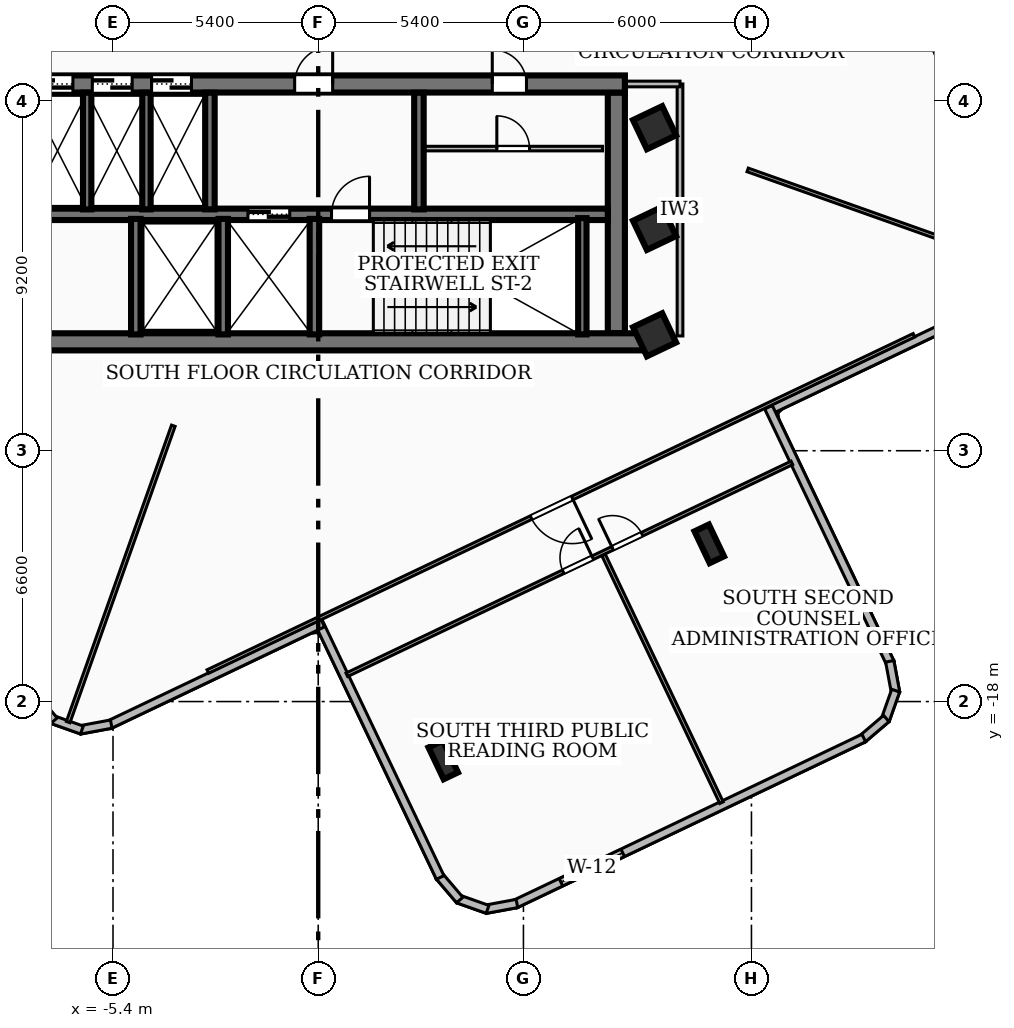
"""IFC4 building model, lengths in metres.
Left out: names, types, materials, properties, quantities, classifications, styles, units other than length and angle.
Written with IfcOpenShell. Run it as: python <this file> out.ifc"""

import sys

from ifc_helpers import new_model, si_unit, direction, frame, frame_2d, origin, origin_2d, place, context, subcontext, project, spatial, rectangle, i_section, extrude, element, fill, save


model = new_model("IFC4")
c1 = context("Model", 3, precision=1e-05, world=origin(), true_north=direction((0.0, 1.0)))
c2 = subcontext(c1, "Body", "Model", "MODEL_VIEW")
j1 = project(units=[si_unit("LENGTHUNIT", "METRE"), si_unit("PLANEANGLEUNIT", "RADIAN")], contexts=[c1])
p1 = place(None, origin())
s1 = spatial("IfcSite", under=j1, at=p1, CompositionType="ELEMENT")
p2 = place(p1, origin())
s2 = spatial("IfcBuilding", under=s1, at=p2, CompositionType="ELEMENT")
p3 = place(p2, frame((0.0, 0.0, 188.28)))
s3 = spatial("IfcBuildingStorey", under=s2, at=p3, CompositionType="ELEMENT", Elevation=188.28)
p4 = place(p3, frame((8.78, -8.535, 0.0), z_axis=(0.0, 0.0, 1.0), x_axis=(-1.0, 0.0, 0.0)))
e1 = element("IfcWall", 1, at=p4, inside=s3, PredefinedType="SHEAR", context=c2, shape_type="SweptSolid", body=[
    extrude(rectangle(XDim=17.56, YDim=0.45, at=frame_2d((8.78, 0.0))), origin(), (0.0, 0.0, 1.0), 4.06),
])
p5 = place(p3, frame((-8.07, -1.75, 0.0), z_axis=(0.0, 0.0, 1.0), x_axis=(1.0, 0.0, 0.0)))
e2 = element("IfcWall", 2, at=p5, inside=s3, PredefinedType="SHEAR", context=c2, shape_type="SweptSolid", body=[
    extrude(rectangle(XDim=16.14, YDim=0.45, at=frame_2d((8.07, 0.0))), origin(), (0.0, 0.0, 1.0), 4.06),
])
p6 = place(p5, frame((7.45, 0.0, 0.0)))
e3 = element("IfcOpeningElement", 3, at=p6, cuts=e2, PredefinedType="OPENING", context=c2, shape_type="SweptSolid", body=[
    extrude(rectangle(XDim=1.0, YDim=2.1, at=frame_2d((0.5, 1.05))), frame((0.0, 0.235, 0.0), z_axis=(0.0, -1.0, 0.0), x_axis=(1.0, 0.0, 0.0)), (0.0, 0.0, 1.0), 0.47),
])
p7 = place(p5, frame((12.65, 0.0, 0.0)))
e4 = element("IfcOpeningElement", 4, at=p7, cuts=e2, PredefinedType="OPENING", context=c2, shape_type="SweptSolid", body=[
    extrude(rectangle(XDim=0.9, YDim=2.06, at=frame_2d((0.45, 1.03))), frame((0.0, 0.235, 0.0), z_axis=(0.0, -1.0, 0.0), x_axis=(1.0, 0.0, 0.0)), (0.0, 0.0, 1.0), 0.47),
])
p8 = place(p5, frame((0.565, 0.0, 0.0)))
e5 = element("IfcOpeningElement", 5, at=p8, cuts=e2, PredefinedType="OPENING", context=c2, shape_type="SweptSolid", body=[
    extrude(rectangle(XDim=1.05, YDim=2.15, at=frame_2d((0.525, 1.075))), frame((0.0, 0.235, 0.0), z_axis=(0.0, -1.0, 0.0), x_axis=(1.0, 0.0, 0.0)), (0.0, 0.0, 1.0), 0.47),
])
p9 = place(p5, frame((2.125, 0.0, 0.0)))
e6 = element("IfcOpeningElement", 6, at=p9, cuts=e2, PredefinedType="OPENING", context=c2, shape_type="SweptSolid", body=[
    extrude(rectangle(XDim=1.05, YDim=2.15, at=frame_2d((0.525, 1.075))), frame((0.0, 0.235, 0.0), z_axis=(0.0, -1.0, 0.0), x_axis=(1.0, 0.0, 0.0)), (0.0, 0.0, 1.0), 0.47),
])
p10 = place(p5, frame((3.685, 0.0, 0.0)))
e7 = element("IfcOpeningElement", 7, at=p10, cuts=e2, PredefinedType="OPENING", context=c2, shape_type="SweptSolid", body=[
    extrude(rectangle(XDim=1.05, YDim=2.15, at=frame_2d((0.525, 1.075))), frame((0.0, 0.235, 0.0), z_axis=(0.0, -1.0, 0.0), x_axis=(1.0, 0.0, 0.0)), (0.0, 0.0, 1.0), 0.47),
])
p11 = place(p3, frame((7.845, -1.975, 0.0), z_axis=(0.0, 0.0, 1.0), x_axis=(0.0, -1.0, 0.0)))
e8 = element("IfcWall", 8, at=p11, inside=s3, PredefinedType="SHEAR", context=c2, shape_type="SweptSolid", body=[
    extrude(rectangle(XDim=6.335, YDim=0.45, at=frame_2d((3.167, 0.0))), origin(), (0.0, 0.0, 1.0), 4.06),
])
p12 = place(p3, frame((-7.62, -5.18, 0.0), z_axis=(0.0, 0.0, 1.0), x_axis=(1.0, 0.0, 0.0)))
e9 = element("IfcWall", 9, at=p12, inside=s3, PredefinedType="SOLIDWALL", context=c2, shape_type="SweptSolid", body=[
    extrude(rectangle(XDim=15.24, YDim=0.3, at=frame_2d((7.62, 0.0))), origin(), (0.0, 0.0, 1.0), 4.06),
])
p13 = place(p12, frame((5.77, 0.0, 0.0)))
e10 = element("IfcOpeningElement", 10, at=p13, cuts=e9, PredefinedType="OPENING", context=c2, shape_type="SweptSolid", body=[
    extrude(rectangle(XDim=1.1, YDim=2.15, at=frame_2d((0.55, 1.075))), frame((0.0, 0.16, 0.0), z_axis=(0.0, -1.0, 0.0), x_axis=(1.0, 0.0, 0.0)), (0.0, 0.0, 1.0), 0.32),
])
p14 = place(p12, frame((7.97, 0.0, 0.0)))
e11 = element("IfcOpeningElement", 11, at=p14, cuts=e9, PredefinedType="OPENING", context=c2, shape_type="SweptSolid", body=[
    extrude(rectangle(XDim=1.0, YDim=2.1, at=frame_2d((0.5, 1.05))), frame((0.0, 0.16, 0.0), z_axis=(0.0, -1.0, 0.0), x_axis=(1.0, 0.0, 0.0)), (0.0, 0.0, 1.0), 0.32),
])
p15 = place(p3, frame((6.95, -8.34, 0.0), z_axis=(0.0, 0.0, 1.0), x_axis=(0.0, 1.0, 0.0)))
e12 = element("IfcWall", 12, at=p15, inside=s3, PredefinedType="SOLIDWALL", context=c2, shape_type="SweptSolid", body=[
    extrude(rectangle(XDim=3.06, YDim=0.22, at=frame_2d((1.53, 0.0))), origin(), (0.0, 0.0, 1.0), 4.06),
])
for number, where, z_axis, x_axis in (
    (13, (-0.1, -8.34, 0.0), (0.0, 0.0, 1.0), (0.0, 1.0, 0.0)),
    (14, (-2.5, -8.34, 0.0), (0.0, 0.0, 1.0), (0.0, 1.0, 0.0)),
    (15, (-4.8, -8.34, 0.0), (0.0, 0.0, 1.0), (0.0, 1.0, 0.0)),
):
    element("IfcWall", number, at=place(p3, frame(where, z_axis=z_axis, x_axis=x_axis)), inside=s3, PredefinedType="SOLIDWALL", context=c2, shape_type="SweptSolid", body=[
        extrude(rectangle(XDim=3.04, YDim=0.25, at=frame_2d((1.52, 0.0))), origin(), (0.0, 0.0, 1.0), 4.06),
    ])
for number, where, z_axis, x_axis in (
    (16, (-2.85, -5.05, 0.0), (0.0, 0.0, 1.0), (0.0, 1.0, 0.0)),
    (17, (2.65, -5.05, 0.0), (0.0, 0.0, 1.0), (0.0, 1.0, 0.0)),
):
    element("IfcWall", number, at=place(p3, frame(where, z_axis=z_axis, x_axis=x_axis)), inside=s3, PredefinedType="SOLIDWALL", context=c2, shape_type="SweptSolid", body=[
        extrude(rectangle(XDim=3.07, YDim=0.25, at=frame_2d((1.535, 0.0))), origin(), (0.0, 0.0, 1.0), 4.06),
    ])
for number, where, z_axis, x_axis in (
    (18, (-6.08, -5.05, 0.0), (0.0, 0.0, 1.0), (0.0, 1.0, 0.0)),
    (19, (-4.52, -5.05, 0.0), (0.0, 0.0, 1.0), (0.0, 1.0, 0.0)),
):
    element("IfcWall", number, at=place(p3, frame(where, z_axis=z_axis, x_axis=x_axis)), inside=s3, PredefinedType="SOLIDWALL", context=c2, shape_type="SweptSolid", body=[
        extrude(rectangle(XDim=3.07, YDim=0.22, at=frame_2d((1.535, 0.0))), origin(), (0.0, 0.0, 1.0), 4.06),
    ])
for number, where, z_axis, x_axis in (
    (20, (8.85, -5.55, 0.0), (0.0, 0.0, 1.0), (0.903, 0.43, 0.0)),
    (21, (8.85, -2.9, 0.0), (0.0, 0.0, 1.0), (0.903, 0.43, 0.0)),
    (22, (8.85, -8.35, 0.0), (0.0, 0.0, 1.0), (0.903, 0.43, 0.0)),
):
    element("IfcColumn", number, at=place(p3, frame(where, z_axis=z_axis, x_axis=x_axis)), inside=s3, PredefinedType="COLUMN", context=c2, shape_type="SweptSolid", body=[
        extrude(rectangle(XDim=0.85, YDim=0.85, at=origin_2d()), origin(), (0.0, 0.0, 1.0), 4.32),
    ])
for number, where, z_axis, x_axis in (
    (23, (3.29, -19.536, 0.0), (0.0, 0.0, 1.0), (0.903, 0.43, 0.0)),
    (24, (10.29, -13.85, 0.0), (0.0, 0.0, 1.0), (0.903, 0.43, 0.0)),
):
    element("IfcColumn", number, at=place(p3, frame(where, z_axis=z_axis, x_axis=x_axis)), inside=s3, PredefinedType="COLUMN", context=c2, shape_type="SweptSolid", body=[
        extrude(i_section(OverallWidth=0.418, OverallDepth=0.927, WebThickness=0.019, FlangeThickness=0.032, at=origin_2d()), origin(), (0.0, 0.0, 1.0), 4.32),
    ])
p16 = place(p3, frame((15.935, 0.119, 0.0), z_axis=(0.0, 0.0, 1.0), x_axis=(0.429997588734, -0.902830035878, 0.0)))
e25 = element("IfcWall", 25, at=p16, inside=s3, PredefinedType="SOLIDWALL", context=c2, shape_type="SweptSolid", body=[
    extrude(rectangle(XDim=6.218, YDim=0.22, at=frame_2d((3.109, 0.0))), origin(), (0.0, 0.0, 1.0), 4.06),
])
p17 = place(p3, frame((17.91, -7.466, 0.0), z_axis=(0.0, 0.0, 1.0), x_axis=(-0.902871867899, -0.429909746524, 0.0)))
e26 = element("IfcWall", 26, at=p17, inside=s3, PredefinedType="SOLIDWALL", context=c2, shape_type="SweptSolid", body=[
    extrude(rectangle(XDim=6.76, YDim=0.22, at=frame_2d((3.38, 0.0))), origin(), (0.0, 0.0, 1.0), 4.06),
])
p18 = place(p3, frame((11.848, -10.255, 0.0), z_axis=(0.0, 0.0, 1.0), x_axis=(0.429966614546, -0.902844787533, 0.0)))
e27 = element("IfcWall", 27, at=p18, inside=s3, PredefinedType="SOLIDWALL", context=c2, shape_type="SweptSolid", body=[
    extrude(rectangle(XDim=7.459, YDim=0.22, at=frame_2d((3.729, 0.0))), origin(), (0.0, 0.0, 1.0), 4.06),
])
p19 = place(p3, frame((15.039, -16.941, 0.0), z_axis=(0.0, 0.0, 1.0), x_axis=(0.182999909077, -0.983112930074, 0.0)))
e28 = element("IfcWall", 28, at=p19, inside=s3, PredefinedType="SOLIDWALL", context=c2, shape_type="SweptSolid", body=[
    extrude(rectangle(XDim=0.835, YDim=0.22, at=frame_2d((0.417, 0.0))), origin(), (0.0, 0.0, 1.0), 4.06),
])
p20 = place(p3, frame((15.195, -17.713, 0.0), z_axis=(0.0, 0.0, 1.0), x_axis=(-0.33420520266, -0.942500335552, 0.0)))
e29 = element("IfcWall", 29, at=p20, inside=s3, PredefinedType="SOLIDWALL", context=c2, shape_type="SweptSolid", body=[
    extrude(rectangle(XDim=0.82, YDim=0.22, at=frame_2d((0.41, 0.0))), origin(), (0.0, 0.0, 1.0), 4.06),
])
p21 = place(p3, frame((14.948, -18.446, 0.0), z_axis=(0.0, 0.0, 1.0), x_axis=(-0.76070207285, -0.649101191157, 0.0)))
e30 = element("IfcWall", 30, at=p21, inside=s3, PredefinedType="SOLIDWALL", context=c2, shape_type="SweptSolid", body=[
    extrude(rectangle(XDim=0.833, YDim=0.22, at=frame_2d((0.417, 0.0))), origin(), (0.0, 0.0, 1.0), 4.06),
])
p22 = place(p3, frame((14.356, -18.96, 0.0), z_axis=(0.0, 0.0, 1.0), x_axis=(-0.902857854372, -0.429939175696, 0.0)))
e31 = element("IfcWall", 31, at=p22, inside=s3, PredefinedType="SOLIDWALL", context=c2, shape_type="SweptSolid", body=[
    extrude(rectangle(XDim=10.162, YDim=0.22, at=frame_2d((5.081, 0.0))), origin(), (0.0, 0.0, 1.0), 4.06),
])
p23 = place(p22, frame((7.026, 0.0, 0.85)))
e32 = element("IfcOpeningElement", 32, at=p23, cuts=e31, PredefinedType="OPENING", context=c2, shape_type="SweptSolid", body=[
    extrude(rectangle(XDim=1.8, YDim=1.6, at=frame_2d((0.9, 0.8))), frame((0.0, 0.12, 0.0), z_axis=(0.0, -1.0, 0.0), x_axis=(1.0, 0.0, 0.0)), (0.0, 0.0, 1.0), 0.24),
])
p24 = place(p3, frame((5.229, -23.313, 0.0), z_axis=(0.0, 0.0, 1.0), x_axis=(-0.983309106839, -0.18194284929, 0.0)))
e33 = element("IfcWall", 33, at=p24, inside=s3, PredefinedType="SOLIDWALL", context=c2, shape_type="SweptSolid", body=[
    extrude(rectangle(XDim=0.836, YDim=0.22, at=frame_2d((0.418, 0.0))), origin(), (0.0, 0.0, 1.0), 4.06),
])
p25 = place(p3, frame((4.456, -23.468, 0.0), z_axis=(0.0, 0.0, 1.0), x_axis=(-0.94293533639, 0.332975902111, 0.0)))
e34 = element("IfcWall", 34, at=p25, inside=s3, PredefinedType="SOLIDWALL", context=c2, shape_type="SweptSolid", body=[
    extrude(rectangle(XDim=0.82, YDim=0.22, at=frame_2d((0.41, 0.0))), origin(), (0.0, 0.0, 1.0), 4.06),
])
p26 = place(p3, frame((3.723, -23.222, 0.0), z_axis=(0.0, 0.0, 1.0), x_axis=(-0.648522984106, 0.761195072952, 0.0)))
e35 = element("IfcWall", 35, at=p26, inside=s3, PredefinedType="SOLIDWALL", context=c2, shape_type="SweptSolid", body=[
    extrude(rectangle(XDim=0.834, YDim=0.22, at=frame_2d((0.417, 0.0))), origin(), (0.0, 0.0, 1.0), 4.06),
])
p27 = place(p3, frame((3.209, -22.629, 0.0), z_axis=(0.0, 0.0, 1.0), x_axis=(-0.429928498614, 0.902862938701, 0.0)))
e36 = element("IfcWall", 36, at=p27, inside=s3, PredefinedType="SOLIDWALL", context=c2, shape_type="SweptSolid", body=[
    extrude(rectangle(XDim=7.459, YDim=0.22, at=frame_2d((3.73, 0.0))), origin(), (0.0, 0.0, 1.0), 4.06),
])
p28 = place(p3, frame((0.119, -15.935, 0.0), z_axis=(0.0, 0.0, 1.0), x_axis=(-0.902830035878, -0.429997588734, 0.0)))
e37 = element("IfcWall", 37, at=p28, inside=s3, PredefinedType="SOLIDWALL", context=c2, shape_type="SweptSolid", body=[
    extrude(rectangle(XDim=6.218, YDim=0.22, at=frame_2d((3.109, 0.0))), origin(), (0.0, 0.0, 1.0), 4.06),
])
p29 = place(p3, frame((-5.447, -18.593, 0.0), z_axis=(0.0, 0.0, 1.0), x_axis=(-0.983060298944, -0.183282428617, 0.0)))
e38 = element("IfcWall", 38, at=p29, inside=s3, PredefinedType="SOLIDWALL", context=c2, shape_type="SweptSolid", body=[
    extrude(rectangle(XDim=0.835, YDim=0.22, at=frame_2d((0.417, 0.0))), origin(), (0.0, 0.0, 1.0), 4.06),
])
p30 = place(p3, frame((-6.219, -18.749, 0.0), z_axis=(0.0, 0.0, 1.0), x_axis=(-0.942560843875, 0.33403451258, 0.0)))
e39 = element("IfcWall", 39, at=p30, inside=s3, PredefinedType="SOLIDWALL", context=c2, shape_type="SweptSolid", body=[
    extrude(rectangle(XDim=0.82, YDim=0.22, at=frame_2d((0.41, 0.0))), origin(), (0.0, 0.0, 1.0), 4.06),
])
p31 = place(p3, frame((-6.952, -18.502, 0.0), z_axis=(0.0, 0.0, 1.0), x_axis=(-0.649101191157, 0.76070207285, 0.0)))
e40 = element("IfcWall", 40, at=p31, inside=s3, PredefinedType="SOLIDWALL", context=c2, shape_type="SweptSolid", body=[
    extrude(rectangle(XDim=0.833, YDim=0.22, at=frame_2d((0.417, 0.0))), origin(), (0.0, 0.0, 1.0), 4.06),
])
p32 = place(p3, frame((2.8, -3.45, 0.0), z_axis=(0.0, 0.0, 1.0), x_axis=(1.0, 0.0, 0.0)))
e41 = element("IfcWall", 41, at=p32, inside=s3, PredefinedType="PARTITIONING", context=c2, shape_type="SweptSolid", body=[
    extrude(rectangle(XDim=4.68, YDim=0.12, at=frame_2d((2.34, 0.0))), origin(), (0.0, 0.0, 1.0), 4.06),
])
p33 = place(p32, frame((1.9, 0.0, 0.0)))
e42 = element("IfcOpeningElement", 42, at=p33, cuts=e41, PredefinedType="OPENING", context=c2, shape_type="SweptSolid", body=[
    extrude(rectangle(XDim=0.86, YDim=2.04, at=frame_2d((0.43, 1.02))), frame((0.0, 0.07, 0.0), z_axis=(0.0, -1.0, 0.0), x_axis=(1.0, 0.0, 0.0)), (0.0, 0.0, 1.0), 0.14),
])
p34 = place(p3, frame((9.52, -8.38, 0.0), z_axis=(0.0, 0.0, 1.0), x_axis=(0.0, 1.0, 0.0)))
e43 = element("IfcWall", 43, at=p34, inside=s3, PredefinedType="PARTITIONING", context=c2, shape_type="SweptSolid", body=[
    extrude(rectangle(XDim=6.63, YDim=0.15, at=frame_2d((3.315, 0.0))), origin(), (0.0, 0.0, 1.0), 4.06),
])
p35 = place(p3, frame((7.85, -1.75, 0.0), z_axis=(0.0, 0.0, 1.0), x_axis=(1.0, 0.0, 0.0)))
e44 = element("IfcWall", 44, at=p35, inside=s3, PredefinedType="PARTITIONING", context=c2, shape_type="SweptSolid", body=[
    extrude(rectangle(XDim=1.67, YDim=0.15, at=frame_2d((0.835, 0.0))), origin(), (0.0, 0.0, 1.0), 3.29),
])
p36 = place(p3, frame((-3.813, -10.743, 0.0), z_axis=(0.0, 0.0, 1.0), x_axis=(-0.334412381202, -0.942426845595, 0.0)))
e45 = element("IfcWall", 45, at=p36, inside=s3, PredefinedType="PARTITIONING", context=c2, shape_type="SweptSolid", body=[
    extrude(rectangle(XDim=8.274, YDim=0.1, at=frame_2d((4.137, 0.0))), origin(), (0.0, 0.0, 1.0), 4.06),
])
p37 = place(p3, frame((11.3, -4.011, 0.0), z_axis=(0.0, 0.0, 1.0), x_axis=(0.942439374513, -0.334377070636, 0.0)))
e46 = element("IfcWall", 46, at=p37, inside=s3, PredefinedType="PARTITIONING", context=c2, shape_type="SweptSolid", body=[
    extrude(rectangle(XDim=7.683, YDim=0.1, at=frame_2d((3.842, 0.0))), origin(), (0.0, 0.0, 1.0), 4.06),
])
p38 = place(p3, frame((8.362, 15.677, 0.0), z_axis=(0.0, 0.0, 1.0), x_axis=(0.429924831179, -0.902864685064, 0.0)))
e47 = element("IfcWall", 47, at=p38, inside=s3, PredefinedType="PARTITIONING", context=c2, shape_type="SweptSolid", body=[
    extrude(rectangle(XDim=20.58, YDim=0.1, at=frame_2d((10.29, 0.0))), origin(), (0.0, 0.0, 1.0), 3.364),
])
p39 = place(p38, frame((9.96, 0.0, 0.0)))
e48 = element("IfcOpeningElement", 48, at=p39, cuts=e47, PredefinedType="OPENING", context=c2, shape_type="SweptSolid", body=[
    extrude(rectangle(XDim=1.2, YDim=2.1, at=frame_2d((0.6, 1.05))), frame((0.0, 0.06, 0.0), z_axis=(0.0, -1.0, 0.0), x_axis=(1.0, 0.0, 0.0)), (0.0, 0.0, 1.0), 0.12),
])
p40 = place(p3, frame((15.677, -8.362, 0.0), z_axis=(0.0, 0.0, 1.0), x_axis=(-0.902864685064, -0.429924831179, 0.0)))
e49 = element("IfcWall", 49, at=p40, inside=s3, PredefinedType="PARTITIONING", context=c2, shape_type="SweptSolid", body=[
    extrude(rectangle(XDim=20.58, YDim=0.1, at=frame_2d((10.29, 0.0))), origin(), (0.0, 0.0, 1.0), 3.364),
])
p41 = place(p40, frame((9.96, 0.0, 0.0)))
e50 = element("IfcOpeningElement", 50, at=p41, cuts=e49, PredefinedType="OPENING", context=c2, shape_type="SweptSolid", body=[
    extrude(rectangle(XDim=1.2, YDim=2.1, at=frame_2d((0.6, 1.05))), frame((0.0, 0.06, 0.0), z_axis=(0.0, -1.0, 0.0), x_axis=(1.0, 0.0, 0.0)), (0.0, 0.0, 1.0), 0.12),
])
p42 = place(p3, frame((7.51, -14.145, 0.0), z_axis=(0.0, 0.0, 1.0), x_axis=(0.429902059569, -0.902875528065, 0.0)))
e51 = element("IfcWall", 51, at=p42, inside=s3, PredefinedType="PARTITIONING", context=c2, shape_type="SweptSolid", body=[
    extrude(rectangle(XDim=7.216, YDim=0.1, at=frame_2d((3.608, 0.0))), origin(), (0.0, 0.0, 1.0), 4.06),
])
p43 = place(p3, frame((0.753, -17.296, 0.0), z_axis=(0.0, 0.0, 1.0), x_axis=(0.902885219382, 0.429881705382, 0.0)))
e52 = element("IfcWall", 52, at=p43, inside=s3, PredefinedType="PARTITIONING", context=c2, shape_type="SweptSolid", body=[
    extrude(rectangle(XDim=12.971, YDim=0.1, at=frame_2d((6.485, 0.0))), origin(), (0.0, 0.0, 1.0), 3.364),
])
p44 = place(p43, frame((6.305, 0.0, 0.0)))
e53 = element("IfcOpeningElement", 53, at=p44, cuts=e52, PredefinedType="OPENING", context=c2, shape_type="SweptSolid", body=[
    extrude(rectangle(XDim=0.86, YDim=2.04, at=frame_2d((0.43, 1.02))), frame((0.0, 0.06, 0.0), z_axis=(0.0, -1.0, 0.0), x_axis=(1.0, 0.0, 0.0)), (0.0, 0.0, 1.0), 0.12),
])
p45 = place(p43, frame((7.744, 0.0, 0.0)))
e54 = element("IfcOpeningElement", 54, at=p45, cuts=e52, PredefinedType="OPENING", context=c2, shape_type="SweptSolid", body=[
    extrude(rectangle(XDim=0.86, YDim=2.04, at=frame_2d((0.43, 1.02))), frame((0.0, 0.06, 0.0), z_axis=(0.0, -1.0, 0.0), x_axis=(1.0, 0.0, 0.0)), (0.0, 0.0, 1.0), 0.12),
])
p46 = place(p23, origin())
e55 = element("IfcWindow", 55, at=p46, inside=s3, PartitioningType="SINGLE_PANEL", PredefinedType="WINDOW", context=c2, shape_type="SweptSolid", body=[
    extrude(rectangle(XDim=1.8, YDim=1.6, at=frame_2d((0.9, 0.8))), frame((0.0, 0.03, 0.0), z_axis=(0.0, -1.0, 0.0), x_axis=(1.0, 0.0, 0.0)), (0.0, 0.0, 1.0), 0.06),
])
fill(e32, e55)
p47 = place(p6, origin())
e56 = element("IfcDoor", 56, at=p47, inside=s3, OperationType="SINGLE_SWING_RIGHT", PredefinedType="DOOR", context=c2, shape_type="SweptSolid", body=[
    extrude(rectangle(XDim=1.0, YDim=2.1, at=frame_2d((0.5, 1.05))), frame((0.0, 0.025, 0.0), z_axis=(0.0, -1.0, 0.0), x_axis=(1.0, 0.0, 0.0)), (0.0, 0.0, 1.0), 0.05),
])
fill(e3, e56)
p48 = place(p13, origin())
e57 = element("IfcDoor", 57, at=p48, inside=s3, OperationType="DOUBLE_DOOR_SLIDING", PredefinedType="DOOR", context=c2, shape_type="SweptSolid", body=[
    extrude(rectangle(XDim=1.1, YDim=2.15, at=frame_2d((0.55, 1.075))), frame((0.0, 0.025, 0.0), z_axis=(0.0, -1.0, 0.0), x_axis=(1.0, 0.0, 0.0)), (0.0, 0.0, 1.0), 0.05),
])
fill(e10, e57)
p49 = place(p14, origin())
e58 = element("IfcDoor", 58, at=p49, inside=s3, OperationType="SINGLE_SWING_RIGHT", PredefinedType="DOOR", context=c2, shape_type="SweptSolid", body=[
    extrude(rectangle(XDim=1.0, YDim=2.1, at=frame_2d((0.5, 1.05))), frame((0.0, 0.025, 0.0), z_axis=(0.0, -1.0, 0.0), x_axis=(1.0, 0.0, 0.0)), (0.0, 0.0, 1.0), 0.05),
])
fill(e11, e58)
p50 = place(p7, origin())
e59 = element("IfcDoor", 59, at=p50, inside=s3, OperationType="SINGLE_SWING_LEFT", PredefinedType="DOOR", context=c2, shape_type="SweptSolid", body=[
    extrude(rectangle(XDim=0.9, YDim=2.06, at=frame_2d((0.45, 1.03))), frame((0.0, 0.025, 0.0), z_axis=(0.0, -1.0, 0.0), x_axis=(1.0, 0.0, 0.0)), (0.0, 0.0, 1.0), 0.05),
])
fill(e4, e59)
p51 = place(p8, origin())
e60 = element("IfcDoor", 60, at=p51, inside=s3, OperationType="DOUBLE_DOOR_SLIDING", PredefinedType="DOOR", context=c2, shape_type="SweptSolid", body=[
    extrude(rectangle(XDim=1.05, YDim=2.15, at=frame_2d((0.525, 1.075))), frame((0.0, 0.025, 0.0), z_axis=(0.0, -1.0, 0.0), x_axis=(1.0, 0.0, 0.0)), (0.0, 0.0, 1.0), 0.05),
])
fill(e5, e60)
p52 = place(p9, origin())
e61 = element("IfcDoor", 61, at=p52, inside=s3, OperationType="DOUBLE_DOOR_SLIDING", PredefinedType="DOOR", context=c2, shape_type="SweptSolid", body=[
    extrude(rectangle(XDim=1.05, YDim=2.15, at=frame_2d((0.525, 1.075))), frame((0.0, 0.025, 0.0), z_axis=(0.0, -1.0, 0.0), x_axis=(1.0, 0.0, 0.0)), (0.0, 0.0, 1.0), 0.05),
])
fill(e6, e61)
p53 = place(p10, origin())
e62 = element("IfcDoor", 62, at=p53, inside=s3, OperationType="DOUBLE_DOOR_SLIDING", PredefinedType="DOOR", context=c2, shape_type="SweptSolid", body=[
    extrude(rectangle(XDim=1.05, YDim=2.15, at=frame_2d((0.525, 1.075))), frame((0.0, 0.025, 0.0), z_axis=(0.0, -1.0, 0.0), x_axis=(1.0, 0.0, 0.0)), (0.0, 0.0, 1.0), 0.05),
])
fill(e7, e62)
p54 = place(p33, origin())
e63 = element("IfcDoor", 63, at=p54, inside=s3, OperationType="SINGLE_SWING_LEFT", PredefinedType="DOOR", context=c2, shape_type="SweptSolid", body=[
    extrude(rectangle(XDim=0.86, YDim=2.04, at=frame_2d((0.43, 1.02))), frame((0.0, 0.025, 0.0), z_axis=(0.0, -1.0, 0.0), x_axis=(1.0, 0.0, 0.0)), (0.0, 0.0, 1.0), 0.05),
])
fill(e42, e63)
p55 = place(p41, origin())
e64 = element("IfcDoor", 64, at=p55, inside=s3, OperationType="SINGLE_SWING_LEFT", PredefinedType="DOOR", context=c2, shape_type="SweptSolid", body=[
    extrude(rectangle(XDim=1.2, YDim=2.1, at=frame_2d((0.6, 1.05))), frame((0.0, 0.025, 0.0), z_axis=(0.0, -1.0, 0.0), x_axis=(1.0, 0.0, 0.0)), (0.0, 0.0, 1.0), 0.05),
])
fill(e50, e64)
p56 = place(p44, origin())
e65 = element("IfcDoor", 65, at=p56, inside=s3, OperationType="SINGLE_SWING_RIGHT", PredefinedType="DOOR", context=c2, shape_type="SweptSolid", body=[
    extrude(rectangle(XDim=0.86, YDim=2.04, at=frame_2d((0.43, 1.02))), frame((0.0, 0.025, 0.0), z_axis=(0.0, -1.0, 0.0), x_axis=(1.0, 0.0, 0.0)), (0.0, 0.0, 1.0), 0.05),
])
fill(e53, e65)
p57 = place(p45, origin())
e66 = element("IfcDoor", 66, at=p57, inside=s3, OperationType="SINGLE_SWING_LEFT", PredefinedType="DOOR", context=c2, shape_type="SweptSolid", body=[
    extrude(rectangle(XDim=0.86, YDim=2.04, at=frame_2d((0.43, 1.02))), frame((0.0, 0.025, 0.0), z_axis=(0.0, -1.0, 0.0), x_axis=(1.0, 0.0, 0.0)), (0.0, 0.0, 1.0), 0.05),
])
fill(e54, e66)
save(model, sys.argv[1])
